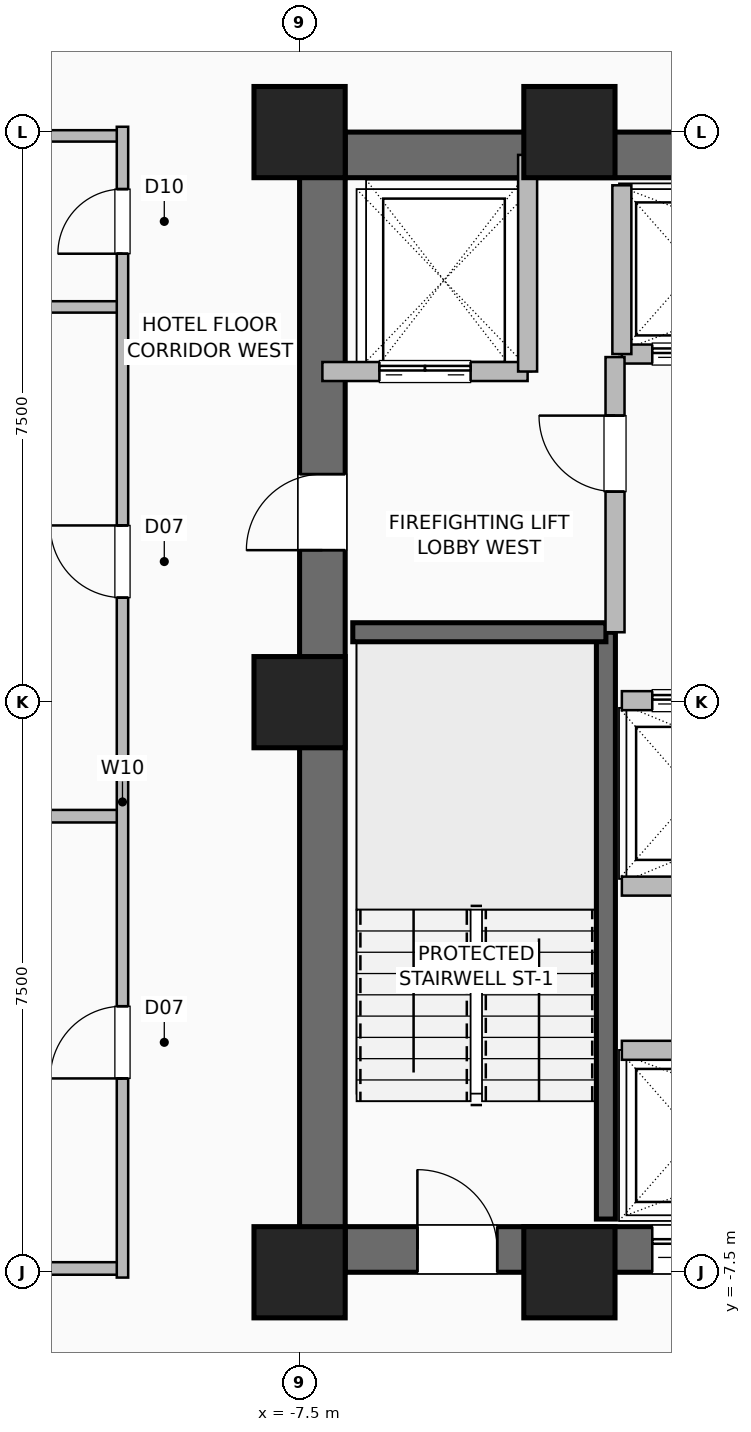
"""IFC4 building model, lengths in metres.
Left out: names, types, materials, properties, quantities, classifications, styles, units other than length and angle.
Written with IfcOpenShell. Run it as: python <this file> out.ifc"""

import sys

from ifc_helpers import new_model, si_unit, direction, frame, frame_2d, origin, origin_2d, place, context, subcontext, project, spatial, rectangle, hollow_rectangle, extrude, element, fill, save


model = new_model("IFC4")
c1 = context("Model", 3, precision=1e-05, world=origin(), true_north=direction((0.0, 1.0)))
c2 = subcontext(c1, "Body", "Model", "MODEL_VIEW")
j1 = project(units=[si_unit("LENGTHUNIT", "METRE"), si_unit("PLANEANGLEUNIT", "RADIAN")], contexts=[c1])
p1 = place(None, origin())
s1 = spatial("IfcSite", under=j1, at=p1, CompositionType="ELEMENT")
p2 = place(p1, origin())
s2 = spatial("IfcBuilding", under=s1, at=p2, CompositionType="ELEMENT")
p3 = place(p2, frame((0.0, 0.0, 65.5)))
s3 = spatial("IfcBuildingStorey", under=s2, at=p3, CompositionType="ELEMENT", Elevation=65.5)
for number, where, z_axis, x_axis in (
    (1, (-7.5, -7.5, 0.0), (0.0, 0.0, 1.0), (1.0, 0.0, 0.0)),
    (2, (-3.95, -7.5, 0.0), (0.0, 0.0, 1.0), (1.0, 0.0, 0.0)),
    (3, (-3.95, 7.5, 0.0), (0.0, 0.0, 1.0), (1.0, 0.0, 0.0)),
    (4, (-7.5, 7.5, 0.0), (0.0, 0.0, 1.0), (1.0, 0.0, 0.0)),
    (5, (-7.5, 0.0, 0.0), (0.0, 0.0, 1.0), (1.0, 0.0, 0.0)),
):
    element("IfcColumn", number, at=place(p3, frame(where, z_axis=z_axis, x_axis=x_axis)), inside=s3, PredefinedType="COLUMN", context=c2, shape_type="SweptSolid", body=[
        extrude(hollow_rectangle(XDim=1.2, YDim=1.2, WallThickness=0.055, at=origin_2d()), origin(), (0.0, 0.0, 1.0), 3.5),
    ])
p4 = place(p3, frame((-7.5, -7.2, 0.0), z_axis=(0.0, 0.0, 1.0), x_axis=(1.0, 0.0, 0.0)))
e6 = element("IfcWall", 6, at=p4, inside=s3, PredefinedType="SHEAR", context=c2, shape_type="SweptSolid", body=[
    extrude(rectangle(XDim=15.0, YDim=0.6, at=frame_2d((7.5, 0.0))), origin(), (0.0, 0.0, 1.0), 3.25),
])
p5 = place(p4, frame((1.55, 0.0, 0.0)))
e7 = element("IfcOpeningElement", 7, at=p5, cuts=e6, PredefinedType="OPENING", context=c2, shape_type="SweptSolid", body=[
    extrude(rectangle(XDim=1.05, YDim=2.08, at=frame_2d((0.525, 1.04))), frame((0.0, 0.31, 0.0), z_axis=(0.0, -1.0, 0.0), x_axis=(1.0, 0.0, 0.0)), (0.0, 0.0, 1.0), 0.62),
])
p6 = place(p4, frame((12.4, 0.0, 0.0)))
e8 = element("IfcOpeningElement", 8, at=p6, cuts=e6, PredefinedType="OPENING", context=c2, shape_type="SweptSolid", body=[
    extrude(rectangle(XDim=1.05, YDim=2.08, at=frame_2d((0.525, 1.04))), frame((0.0, 0.31, 0.0), z_axis=(0.0, -1.0, 0.0), x_axis=(1.0, 0.0, 0.0)), (0.0, 0.0, 1.0), 0.62),
])
p7 = place(p4, frame((4.64, 0.0, 0.0)))
e9 = element("IfcOpeningElement", 9, at=p7, cuts=e6, PredefinedType="OPENING", context=c2, shape_type="SweptSolid", body=[
    extrude(rectangle(XDim=1.1, YDim=2.2, at=frame_2d((0.55, 1.1))), frame((0.0, 0.31, 0.0), z_axis=(0.0, -1.0, 0.0), x_axis=(1.0, 0.0, 0.0)), (0.0, 0.0, 1.0), 0.62),
])
p8 = place(p4, frame((6.52, 0.0, 0.0)))
e10 = element("IfcOpeningElement", 10, at=p8, cuts=e6, PredefinedType="OPENING", context=c2, shape_type="SweptSolid", body=[
    extrude(rectangle(XDim=1.1, YDim=2.2, at=frame_2d((0.55, 1.1))), frame((0.0, 0.31, 0.0), z_axis=(0.0, -1.0, 0.0), x_axis=(1.0, 0.0, 0.0)), (0.0, 0.0, 1.0), 0.62),
])
p9 = place(p4, frame((8.4, 0.0, 0.0)))
e11 = element("IfcOpeningElement", 11, at=p9, cuts=e6, PredefinedType="OPENING", context=c2, shape_type="SweptSolid", body=[
    extrude(rectangle(XDim=1.1, YDim=2.2, at=frame_2d((0.55, 1.1))), frame((0.0, 0.31, 0.0), z_axis=(0.0, -1.0, 0.0), x_axis=(1.0, 0.0, 0.0)), (0.0, 0.0, 1.0), 0.62),
])
p10 = place(p3, frame((-7.5, 7.2, 0.0), z_axis=(0.0, 0.0, 1.0), x_axis=(1.0, 0.0, 0.0)))
e12 = element("IfcWall", 12, at=p10, inside=s3, PredefinedType="SHEAR", context=c2, shape_type="SweptSolid", body=[
    extrude(rectangle(XDim=15.0, YDim=0.6, at=frame_2d((7.5, 0.0))), origin(), (0.0, 0.0, 1.0), 3.25),
])
p11 = place(p3, frame((-7.2, -7.5, 0.0), z_axis=(0.0, 0.0, 1.0), x_axis=(0.0, 1.0, 0.0)))
e13 = element("IfcWall", 13, at=p11, inside=s3, PredefinedType="SHEAR", context=c2, shape_type="SweptSolid", body=[
    extrude(rectangle(XDim=15.0, YDim=0.6, at=frame_2d((7.5, 0.0))), origin(), (0.0, 0.0, 1.0), 3.25),
])
p12 = place(p11, frame((9.5, 0.0, 0.0)))
e14 = element("IfcOpeningElement", 14, at=p12, cuts=e13, PredefinedType="OPENING", context=c2, shape_type="SweptSolid", body=[
    extrude(rectangle(XDim=1.0, YDim=2.08, at=frame_2d((0.5, 1.04))), frame((0.0, 0.31, 0.0), z_axis=(0.0, -1.0, 0.0), x_axis=(1.0, 0.0, 0.0)), (0.0, 0.0, 1.0), 0.62),
])
p13 = place(p3, frame((-3.47, -6.8, 0.0), z_axis=(0.0, 0.0, 1.0), x_axis=(0.0, 1.0, 0.0)))
e15 = element("IfcWall", 15, at=p13, inside=s3, PredefinedType="SHEAR", context=c2, shape_type="SweptSolid", body=[
    extrude(rectangle(XDim=7.72, YDim=0.25, at=frame_2d((3.86, 0.0))), origin(), (0.0, 0.0, 1.0), 3.25),
])
p14 = place(p3, frame((-6.8, 0.92, 0.0), z_axis=(0.0, 0.0, 1.0), x_axis=(1.0, 0.0, 0.0)))
e16 = element("IfcWall", 16, at=p14, inside=s3, PredefinedType="SHEAR", context=c2, shape_type="SweptSolid", body=[
    extrude(rectangle(XDim=3.33, YDim=0.25, at=frame_2d((1.665, 0.0))), origin(), (0.0, 0.0, 1.0), 3.25),
])
p15 = place(p3, frame((-3.26, -4.58, 0.0), z_axis=(0.0, 0.0, 1.0), x_axis=(1.0, 0.0, 0.0)))
e17 = element("IfcWall", 17, at=p15, inside=s3, PredefinedType="SHEAR", context=c2, shape_type="SweptSolid", body=[
    extrude(rectangle(XDim=5.64, YDim=0.25, at=frame_2d((2.82, 0.0))), origin(), (0.0, 0.0, 1.0), 3.25),
])
p16 = place(p3, frame((-3.26, 0.02, 0.0), z_axis=(0.0, 0.0, 1.0), x_axis=(1.0, 0.0, 0.0)))
e18 = element("IfcWall", 18, at=p16, inside=s3, PredefinedType="SHEAR", context=c2, shape_type="SweptSolid", body=[
    extrude(rectangle(XDim=5.64, YDim=0.25, at=frame_2d((2.82, 0.0))), origin(), (0.0, 0.0, 1.0), 3.25),
])
p17 = place(p16, frame((0.4, 0.0, 0.0)))
e19 = element("IfcOpeningElement", 19, at=p17, cuts=e18, PredefinedType="OPENING", context=c2, shape_type="SweptSolid", body=[
    extrude(rectangle(XDim=1.1, YDim=2.2, at=frame_2d((0.55, 1.1))), frame((0.0, 0.135, 0.0), z_axis=(0.0, -1.0, 0.0), x_axis=(1.0, 0.0, 0.0)), (0.0, 0.0, 1.0), 0.27),
])
p18 = place(p16, frame((2.28, 0.0, 0.0)))
e20 = element("IfcOpeningElement", 20, at=p18, cuts=e18, PredefinedType="OPENING", context=c2, shape_type="SweptSolid", body=[
    extrude(rectangle(XDim=1.1, YDim=2.2, at=frame_2d((0.55, 1.1))), frame((0.0, 0.135, 0.0), z_axis=(0.0, -1.0, 0.0), x_axis=(1.0, 0.0, 0.0)), (0.0, 0.0, 1.0), 0.27),
])
p19 = place(p16, frame((4.16, 0.0, 0.0)))
e21 = element("IfcOpeningElement", 21, at=p19, cuts=e18, PredefinedType="OPENING", context=c2, shape_type="SweptSolid", body=[
    extrude(rectangle(XDim=1.1, YDim=2.2, at=frame_2d((0.55, 1.1))), frame((0.0, 0.135, 0.0), z_axis=(0.0, -1.0, 0.0), x_axis=(1.0, 0.0, 0.0)), (0.0, 0.0, 1.0), 0.27),
])
p20 = place(p3, frame((-3.26, -2.42, 0.0), z_axis=(0.0, 0.0, 1.0), x_axis=(1.0, 0.0, 0.0)))
e22 = element("IfcWall", 22, at=p20, inside=s3, PredefinedType="SHEAR", context=c2, shape_type="SweptSolid", body=[
    extrude(rectangle(XDim=5.64, YDim=0.25, at=frame_2d((2.82, 0.0))), origin(), (0.0, 0.0, 1.0), 3.25),
])
p21 = place(p3, frame((-3.26, 4.58, 0.0), z_axis=(0.0, 0.0, 1.0), x_axis=(1.0, 0.0, 0.0)))
e23 = element("IfcWall", 23, at=p21, inside=s3, PredefinedType="SHEAR", context=c2, shape_type="SweptSolid", body=[
    extrude(rectangle(XDim=5.64, YDim=0.25, at=frame_2d((2.82, 0.0))), origin(), (0.0, 0.0, 1.0), 3.25),
])
p22 = place(p21, frame((0.4, 0.0, 0.0)))
e24 = element("IfcOpeningElement", 24, at=p22, cuts=e23, PredefinedType="OPENING", context=c2, shape_type="SweptSolid", body=[
    extrude(rectangle(XDim=1.1, YDim=2.2, at=frame_2d((0.55, 1.1))), frame((0.0, 0.135, 0.0), z_axis=(0.0, -1.0, 0.0), x_axis=(1.0, 0.0, 0.0)), (0.0, 0.0, 1.0), 0.27),
])
p23 = place(p21, frame((2.28, 0.0, 0.0)))
e25 = element("IfcOpeningElement", 25, at=p23, cuts=e23, PredefinedType="OPENING", context=c2, shape_type="SweptSolid", body=[
    extrude(rectangle(XDim=1.1, YDim=2.2, at=frame_2d((0.55, 1.1))), frame((0.0, 0.135, 0.0), z_axis=(0.0, -1.0, 0.0), x_axis=(1.0, 0.0, 0.0)), (0.0, 0.0, 1.0), 0.27),
])
p24 = place(p21, frame((4.16, 0.0, 0.0)))
e26 = element("IfcOpeningElement", 26, at=p24, cuts=e23, PredefinedType="OPENING", context=c2, shape_type="SweptSolid", body=[
    extrude(rectangle(XDim=1.1, YDim=2.2, at=frame_2d((0.55, 1.1))), frame((0.0, 0.135, 0.0), z_axis=(0.0, -1.0, 0.0), x_axis=(1.0, 0.0, 0.0)), (0.0, 0.0, 1.0), 0.27),
])
p25 = place(p3, frame((-3.26, 4.58, 0.0), z_axis=(0.0, 0.0, 1.0), x_axis=(0.0, 1.0, 0.0)))
e27 = element("IfcWall", 27, at=p25, inside=s3, PredefinedType="SHEAR", context=c2, shape_type="SweptSolid", body=[
    extrude(rectangle(XDim=2.22, YDim=0.25, at=frame_2d((1.11, 0.0))), origin(), (0.0, 0.0, 1.0), 3.25),
])
p26 = place(p3, frame((-7.2, 4.35, 0.0), z_axis=(0.0, 0.0, 1.0), x_axis=(1.0, 0.0, 0.0)))
e28 = element("IfcWall", 28, at=p26, inside=s3, PredefinedType="SHEAR", context=c2, shape_type="SweptSolid", body=[
    extrude(rectangle(XDim=2.7, YDim=0.25, at=frame_2d((1.35, 0.0))), origin(), (0.0, 0.0, 1.0), 3.25),
])
p27 = place(p26, frame((0.75, 0.0, 0.0)))
e29 = element("IfcOpeningElement", 29, at=p27, cuts=e28, PredefinedType="OPENING", context=c2, shape_type="SweptSolid", body=[
    extrude(rectangle(XDim=1.2, YDim=2.2, at=frame_2d((0.6, 1.1))), frame((0.0, 0.135, 0.0), z_axis=(0.0, -1.0, 0.0), x_axis=(1.0, 0.0, 0.0)), (0.0, 0.0, 1.0), 0.27),
])
p28 = place(p3, frame((-4.5, 4.35, 0.0), z_axis=(0.0, 0.0, 1.0), x_axis=(0.0, 1.0, 0.0)))
e30 = element("IfcWall", 30, at=p28, inside=s3, PredefinedType="SHEAR", context=c2, shape_type="SweptSolid", body=[
    extrude(rectangle(XDim=2.85, YDim=0.25, at=frame_2d((1.425, 0.0))), origin(), (0.0, 0.0, 1.0), 3.25),
])
p29 = place(p3, frame((-3.35, 0.92, 0.0), z_axis=(0.0, 0.0, 1.0), x_axis=(0.0, 1.0, 0.0)))
e31 = element("IfcWall", 31, at=p29, inside=s3, PredefinedType="SHEAR", context=c2, shape_type="SweptSolid", body=[
    extrude(rectangle(XDim=3.62, YDim=0.25, at=frame_2d((1.81, 0.0))), origin(), (0.0, 0.0, 1.0), 3.25),
])
p30 = place(p29, frame((1.85, 0.0, 0.0)))
e32 = element("IfcOpeningElement", 32, at=p30, cuts=e31, PredefinedType="OPENING", context=c2, shape_type="SweptSolid", body=[
    extrude(rectangle(XDim=1.0, YDim=2.08, at=frame_2d((0.5, 1.04))), frame((0.0, 0.135, 0.0), z_axis=(0.0, -1.0, 0.0), x_axis=(1.0, 0.0, 0.0)), (0.0, 0.0, 1.0), 0.27),
])
for number, where, z_axis, x_axis in (
    (33, (-23.82, -7.45, 0.0), (0.0, 0.0, 1.0), (1.0, 0.0, 0.0)),
    (34, (-23.82, -1.5, 0.0), (0.0, 0.0, 1.0), (1.0, 0.0, 0.0)),
):
    element("IfcWall", number, at=place(p3, frame(where, z_axis=z_axis, x_axis=x_axis)), inside=s3, PredefinedType="PLUMBINGWALL", context=c2, shape_type="SweptSolid", body=[
        extrude(rectangle(XDim=13.99, YDim=0.165, at=frame_2d((6.995, 0.0))), origin(), (0.0, 0.0, 1.0), 3.25),
    ])
for number, where, z_axis, x_axis in (
    (35, (-23.82, 5.2, 0.0), (0.0, 0.0, 1.0), (1.0, 0.0, 0.0)),
    (36, (-23.82, 7.45, 0.0), (0.0, 0.0, 1.0), (1.0, 0.0, 0.0)),
):
    element("IfcWall", number, at=place(p3, frame(where, z_axis=z_axis, x_axis=x_axis)), inside=s3, PredefinedType="PARTITIONING", context=c2, shape_type="SweptSolid", body=[
        extrude(rectangle(XDim=13.99, YDim=0.15, at=frame_2d((6.995, 0.0))), origin(), (0.0, 0.0, 1.0), 3.25),
    ])
p31 = place(p3, frame((-9.83, -7.57, 0.0), z_axis=(0.0, 0.0, 1.0), x_axis=(0.0, 1.0, 0.0)))
e37 = element("IfcWall", 37, at=p31, inside=s3, PredefinedType="PARTITIONING", context=c2, shape_type="SweptSolid", body=[
    extrude(rectangle(XDim=15.14, YDim=0.15, at=frame_2d((7.57, 0.0))), origin(), (0.0, 0.0, 1.0), 3.25),
])
p32 = place(p31, frame((2.62, 0.0, 0.0)))
e38 = element("IfcOpeningElement", 38, at=p32, cuts=e37, PredefinedType="OPENING", context=c2, shape_type="SweptSolid", body=[
    extrude(rectangle(XDim=0.95, YDim=2.06, at=frame_2d((0.475, 1.03))), frame((0.0, 0.085, 0.0), z_axis=(0.0, -1.0, 0.0), x_axis=(1.0, 0.0, 0.0)), (0.0, 0.0, 1.0), 0.17),
])
p33 = place(p31, frame((8.945, 0.0, 0.0)))
e39 = element("IfcOpeningElement", 39, at=p33, cuts=e37, PredefinedType="OPENING", context=c2, shape_type="SweptSolid", body=[
    extrude(rectangle(XDim=0.95, YDim=2.06, at=frame_2d((0.475, 1.03))), frame((0.0, 0.085, 0.0), z_axis=(0.0, -1.0, 0.0), x_axis=(1.0, 0.0, 0.0)), (0.0, 0.0, 1.0), 0.17),
])
p34 = place(p31, frame((13.47, 0.0, 0.0)))
e40 = element("IfcOpeningElement", 40, at=p34, cuts=e37, PredefinedType="OPENING", context=c2, shape_type="SweptSolid", body=[
    extrude(rectangle(XDim=0.85, YDim=2.05, at=frame_2d((0.425, 1.025))), frame((0.0, 0.085, 0.0), z_axis=(0.0, -1.0, 0.0), x_axis=(1.0, 0.0, 0.0)), (0.0, 0.0, 1.0), 0.17),
])
p35 = place(p5, origin())
e41 = element("IfcDoor", 41, at=p35, inside=s3, OperationType="SINGLE_SWING_LEFT", PredefinedType="DOOR", context=c2, shape_type="SweptSolid", body=[
    extrude(rectangle(XDim=1.05, YDim=2.08, at=frame_2d((0.525, 1.04))), frame((0.0, 0.025, 0.0), z_axis=(0.0, -1.0, 0.0), x_axis=(1.0, 0.0, 0.0)), (0.0, 0.0, 1.0), 0.05),
])
fill(e7, e41)
p36 = place(p12, origin())
e42 = element("IfcDoor", 42, at=p36, inside=s3, OperationType="SINGLE_SWING_LEFT", PredefinedType="DOOR", context=c2, shape_type="SweptSolid", body=[
    extrude(rectangle(XDim=1.0, YDim=2.08, at=frame_2d((0.5, 1.04))), frame((0.0, 0.025, 0.0), z_axis=(0.0, -1.0, 0.0), x_axis=(1.0, 0.0, 0.0)), (0.0, 0.0, 1.0), 0.05),
])
fill(e14, e42)
p37 = place(p7, origin())
e43 = element("IfcDoor", 43, at=p37, inside=s3, OperationType="DOUBLE_DOOR_SLIDING", PredefinedType="DOOR", context=c2, shape_type="SweptSolid", body=[
    extrude(rectangle(XDim=1.1, YDim=2.2, at=frame_2d((0.55, 1.1))), frame((0.0, 0.025, 0.0), z_axis=(0.0, -1.0, 0.0), x_axis=(1.0, 0.0, 0.0)), (0.0, 0.0, 1.0), 0.05),
])
fill(e9, e43)
p38 = place(p17, origin())
e44 = element("IfcDoor", 44, at=p38, inside=s3, OperationType="DOUBLE_DOOR_SLIDING", PredefinedType="DOOR", context=c2, shape_type="SweptSolid", body=[
    extrude(rectangle(XDim=1.1, YDim=2.2, at=frame_2d((0.55, 1.1))), frame((0.0, 0.025, 0.0), z_axis=(0.0, -1.0, 0.0), x_axis=(1.0, 0.0, 0.0)), (0.0, 0.0, 1.0), 0.05),
])
fill(e19, e44)
p39 = place(p22, origin())
e45 = element("IfcDoor", 45, at=p39, inside=s3, OperationType="DOUBLE_DOOR_SLIDING", PredefinedType="DOOR", context=c2, shape_type="SweptSolid", body=[
    extrude(rectangle(XDim=1.1, YDim=2.2, at=frame_2d((0.55, 1.1))), frame((0.0, 0.025, 0.0), z_axis=(0.0, -1.0, 0.0), x_axis=(1.0, 0.0, 0.0)), (0.0, 0.0, 1.0), 0.05),
])
fill(e24, e45)
p40 = place(p27, origin())
e46 = element("IfcDoor", 46, at=p40, inside=s3, OperationType="DOUBLE_DOOR_SLIDING", PredefinedType="DOOR", context=c2, shape_type="SweptSolid", body=[
    extrude(rectangle(XDim=1.2, YDim=2.2, at=frame_2d((0.6, 1.1))), frame((0.0, 0.025, 0.0), z_axis=(0.0, -1.0, 0.0), x_axis=(1.0, 0.0, 0.0)), (0.0, 0.0, 1.0), 0.05),
])
fill(e29, e46)
p41 = place(p30, origin())
e47 = element("IfcDoor", 47, at=p41, inside=s3, OperationType="SINGLE_SWING_RIGHT", PredefinedType="DOOR", context=c2, shape_type="SweptSolid", body=[
    extrude(rectangle(XDim=1.0, YDim=2.08, at=frame_2d((0.5, 1.04))), frame((0.0, 0.025, 0.0), z_axis=(0.0, -1.0, 0.0), x_axis=(1.0, 0.0, 0.0)), (0.0, 0.0, 1.0), 0.05),
])
fill(e32, e47)
p42 = place(p32, origin())
e48 = element("IfcDoor", 48, at=p42, inside=s3, OperationType="SINGLE_SWING_LEFT", PredefinedType="DOOR", context=c2, shape_type="SweptSolid", body=[
    extrude(rectangle(XDim=0.95, YDim=2.06, at=frame_2d((0.475, 1.03))), frame((0.0, 0.025, 0.0), z_axis=(0.0, -1.0, 0.0), x_axis=(1.0, 0.0, 0.0)), (0.0, 0.0, 1.0), 0.05),
])
fill(e38, e48)
p43 = place(p33, origin())
e49 = element("IfcDoor", 49, at=p43, inside=s3, OperationType="SINGLE_SWING_RIGHT", PredefinedType="DOOR", context=c2, shape_type="SweptSolid", body=[
    extrude(rectangle(XDim=0.95, YDim=2.06, at=frame_2d((0.475, 1.03))), frame((0.0, 0.025, 0.0), z_axis=(0.0, -1.0, 0.0), x_axis=(1.0, 0.0, 0.0)), (0.0, 0.0, 1.0), 0.05),
])
fill(e39, e49)
p44 = place(p34, origin())
e50 = element("IfcDoor", 50, at=p44, inside=s3, OperationType="SINGLE_SWING_LEFT", PredefinedType="DOOR", context=c2, shape_type="SweptSolid", body=[
    extrude(rectangle(XDim=0.85, YDim=2.05, at=frame_2d((0.425, 1.025))), frame((0.0, 0.025, 0.0), z_axis=(0.0, -1.0, 0.0), x_axis=(1.0, 0.0, 0.0)), (0.0, 0.0, 1.0), 0.05),
])
fill(e40, e50)
save(model, sys.argv[1])
